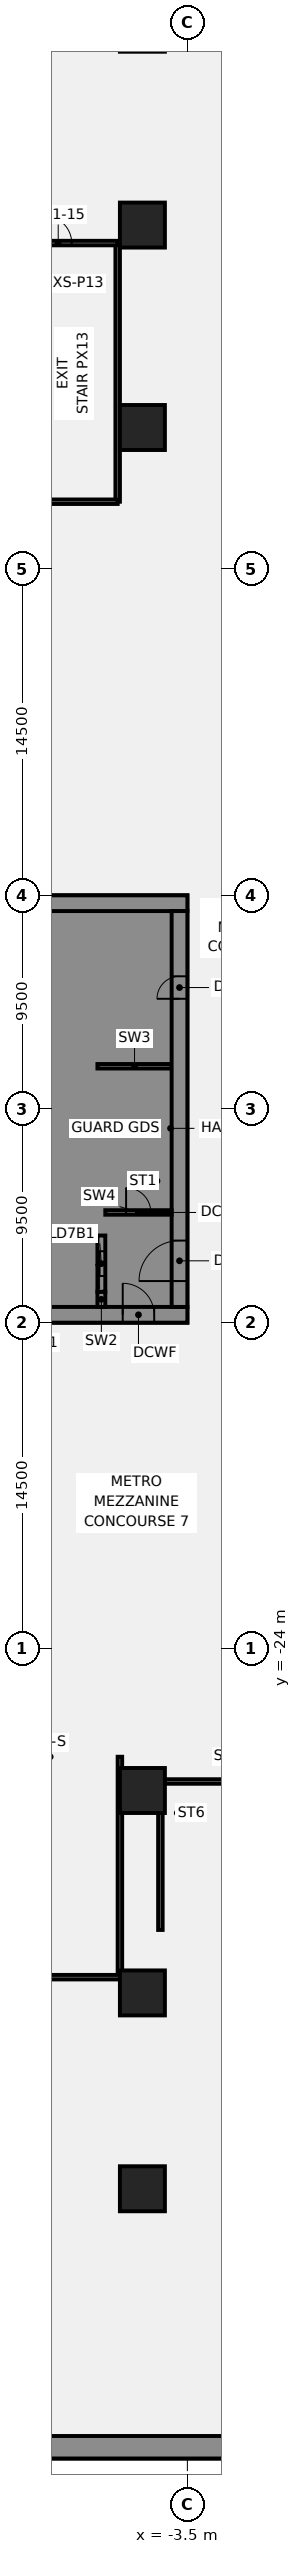
"""IFC4 building model, lengths in metres.
Left out: names, types, materials, properties, quantities, classifications, styles, units other than length and angle.
Written with IfcOpenShell. Run it as: python <this file> out.ifc"""

import sys

from ifc_helpers import new_model, si_unit, direction, frame, frame_2d, origin, origin_2d, place, context, subcontext, project, spatial, polyline, rectangle, outline, extrude, element, fill, save


model = new_model("IFC4")
c1 = context("Model", 3, precision=1e-05, world=origin(), true_north=direction((0.0, 1.0)))
c2 = subcontext(c1, "Body", "Model", "MODEL_VIEW")
j1 = project(units=[si_unit("LENGTHUNIT", "METRE"), si_unit("PLANEANGLEUNIT", "RADIAN")], contexts=[c1])
p1 = place(None, origin())
s1 = spatial("IfcSite", under=j1, at=p1, CompositionType="ELEMENT")
p2 = place(p1, origin())
s2 = spatial("IfcBuilding", under=s1, at=p2, CompositionType="ELEMENT")
p3 = place(p2, frame((0.0, 0.0, -7.0)))
s3 = spatial("IfcBuildingStorey", under=s2, at=p3, CompositionType="ELEMENT", Elevation=-7.0)
p4 = place(p3, frame((63.931, -59.5, -0.45), z_axis=(0.0, 0.0, 1.0), x_axis=(-1.0, 0.0, 0.0)))
e1 = element("IfcWall", 1, at=p4, inside=s3, PredefinedType="SOLIDWALL", context=c2, shape_type="SweptSolid", body=[
    extrude(rectangle(XDim=127.863, YDim=1.0, at=frame_2d((63.931, 0.0))), origin(), (0.0, 0.0, 1.0), 6.9),
])
for number, where, z_axis, x_axis in (
    (2, (-5.5, 39.3, -0.45), (0.0, 0.0, 1.0), (1.0, 0.0, 0.0)),
    (3, (-5.5, 30.3, -0.45), (0.0, 0.0, 1.0), (1.0, 0.0, 0.0)),
    (4, (-5.5, -39.3, -0.45), (0.0, 0.0, 1.0), (1.0, 0.0, 0.0)),
    (5, (-5.5, -30.3, -0.45), (0.0, 0.0, 1.0), (1.0, 0.0, 0.0)),
    (6, (-5.5, -48.008, -0.45), (0.0, 0.0, 1.0), (1.0, 0.0, 0.0)),
):
    element("IfcColumn", number, at=place(p3, frame(where, z_axis=z_axis, x_axis=x_axis)), inside=s3, PredefinedType="COLUMN", context=c2, shape_type="SweptSolid", body=[
        extrude(rectangle(XDim=2.0, YDim=2.0, at=origin_2d()), origin(), (0.0, 0.0, 1.0), 6.9),
    ])
p5 = place(p3, frame((-6.6, 27.0, 0.0), z_axis=(0.0, 0.0, 1.0), x_axis=(0.0, 1.0, 0.0)))
e7 = element("IfcWall", 7, at=p5, inside=s3, PredefinedType="PARTITIONING", context=c2, shape_type="SweptSolid", body=[
    extrude(rectangle(XDim=11.5, YDim=0.2, at=frame_2d((5.75, 0.0))), origin(), (0.0, 0.0, 1.0), 6.45),
])
p6 = place(p3, frame((-10.5, 27.0, 0.0), z_axis=(0.0, 0.0, 1.0), x_axis=(1.0, 0.0, 0.0)))
e8 = element("IfcWall", 8, at=p6, inside=s3, PredefinedType="PARTITIONING", context=c2, shape_type="SweptSolid", body=[
    extrude(rectangle(XDim=3.9, YDim=0.2, at=frame_2d((1.95, 0.0))), origin(), (0.0, 0.0, 1.0), 6.45),
])
p7 = place(p3, frame((-10.5, 38.5, 0.0), z_axis=(0.0, 0.0, 1.0), x_axis=(1.0, 0.0, 0.0)))
e9 = element("IfcWall", 9, at=p7, inside=s3, PredefinedType="PARTITIONING", context=c2, shape_type="SweptSolid", body=[
    extrude(rectangle(XDim=3.9, YDim=0.2, at=frame_2d((1.95, 0.0))), origin(), (0.0, 0.0, 1.0), 6.45),
])
p8 = place(p7, frame((0.656, 0.0, 0.0)))
e10 = element("IfcOpeningElement", 10, at=p8, cuts=e9, PredefinedType="OPENING", context=c2, shape_type="SweptSolid", body=[
    extrude(rectangle(XDim=1.2, YDim=2.1, at=frame_2d((0.6, 1.05))), frame((0.0, 0.11, 0.0), z_axis=(0.0, -1.0, 0.0), x_axis=(1.0, 0.0, 0.0)), (0.0, 0.0, 1.0), 0.22),
])
p9 = place(p3, frame((-6.5, -28.8, 0.0), z_axis=(0.0, 0.0, 1.0), x_axis=(0.0, -1.0, 0.0)))
e11 = element("IfcWall", 11, at=p9, inside=s3, PredefinedType="SOLIDWALL", context=c2, shape_type="SweptSolid", body=[
    extrude(rectangle(XDim=9.7, YDim=0.2, at=frame_2d((4.85, 0.0))), origin(), (0.0, 0.0, 1.0), 6.45),
])
p10 = place(p3, frame((-10.7, -38.6, 0.0), z_axis=(0.0, 0.0, 1.0), x_axis=(1.0, 0.0, 0.0)))
e12 = element("IfcWall", 12, at=p10, inside=s3, PredefinedType="SOLIDWALL", context=c2, shape_type="SweptSolid", body=[
    extrude(rectangle(XDim=4.3, YDim=0.2, at=frame_2d((2.15, 0.0))), origin(), (0.0, 0.0, 1.0), 6.45),
])
p11 = place(p3, frame((-16.5, -9.15, 0.0), z_axis=(0.0, 0.0, 1.0), x_axis=(1.0, 0.0, 0.0)))
e13 = element("IfcWall", 13, at=p11, inside=s3, PredefinedType="SHEAR", context=c2, shape_type="SweptSolid", body=[
    extrude(rectangle(XDim=13.0, YDim=0.7, at=frame_2d((6.5, 0.0))), origin(), (0.0, 0.0, 1.0), 6.45),
])
p12 = place(p11, frame((4.15, 0.0, 0.0)))
e14 = element("IfcOpeningElement", 14, at=p12, cuts=e13, PredefinedType="OPENING", context=c2, shape_type="SweptSolid", body=[
    extrude(rectangle(XDim=1.4, YDim=2.1, at=frame_2d((0.7, 1.05))), frame((0.0, 0.36, 0.0), z_axis=(0.0, -1.0, 0.0), x_axis=(1.0, 0.0, 0.0)), (0.0, 0.0, 1.0), 0.72),
])
p13 = place(p11, frame((10.125, 0.0, 0.0)))
e15 = element("IfcOpeningElement", 15, at=p13, cuts=e13, PredefinedType="OPENING", context=c2, shape_type="SweptSolid", body=[
    extrude(rectangle(XDim=1.4, YDim=2.1, at=frame_2d((0.7, 1.05))), frame((0.0, 0.36, 0.0), z_axis=(0.0, -1.0, 0.0), x_axis=(1.0, 0.0, 0.0)), (0.0, 0.0, 1.0), 0.72),
])
p14 = place(p3, frame((-16.5, 9.15, 0.0), z_axis=(0.0, 0.0, 1.0), x_axis=(1.0, 0.0, 0.0)))
e16 = element("IfcWall", 16, at=p14, inside=s3, PredefinedType="SHEAR", context=c2, shape_type="SweptSolid", body=[
    extrude(rectangle(XDim=13.0, YDim=0.7, at=frame_2d((6.5, 0.0))), origin(), (0.0, 0.0, 1.0), 6.45),
])
p15 = place(p3, origin())
e17 = element("IfcWall", 17, at=p15, inside=s3, PredefinedType="SHEAR", context=c2, shape_type="SweptSolid", body=[
    extrude(outline(polyline([(-9.8, -5.375), (-9.8, -5.625), (-7.5, -5.625), (-7.15, -5.625), (-7.15, 8.8), (-7.5, 8.8), (-9.8, 8.8), (-9.8, 8.125), (-7.5, 8.125), (-7.5, 5.625), (-9.8, 5.625), (-9.8, 5.375), (-7.5, 5.375), (-7.5, 2.875), (-9.8, 2.875), (-9.8, 2.625), (-7.5, 2.625), (-7.5, 0.125), (-9.8, 0.125), (-9.8, -0.125), (-7.5, -0.125), (-7.5, -2.625), (-9.8, -2.625), (-9.8, -2.875), (-7.5, -2.875), (-7.5, -5.375), (-9.8, -5.375)])), origin(), (0.0, 0.0, 1.0), 6.45),
])
p16 = place(p3, origin())
e18 = element("IfcWall", 18, at=p16, inside=s3, PredefinedType="SHEAR", context=c2, shape_type="SweptSolid", body=[
    extrude(outline(polyline([(-7.5, -8.125), (-9.55, -8.125), (-9.55, -5.625), (-9.8, -5.625), (-9.8, -8.125), (-9.8, -8.8), (-7.5, -8.8), (-7.5, -8.125)])), origin(), (0.0, 0.0, 1.0), 6.45),
])
p17 = place(p3, frame((-7.325, -8.8, 0.0), z_axis=(0.0, 0.0, 1.0), x_axis=(0.0, 1.0, 0.0)))
e19 = element("IfcWall", 19, at=p17, inside=s3, PredefinedType="SHEAR", context=c2, shape_type="SweptSolid", body=[
    extrude(rectangle(XDim=0.675, YDim=0.35, at=frame_2d((0.337, 0.0))), origin(), (0.0, 0.0, 1.0), 6.45),
])
p18 = place(p3, frame((-7.5, 1.9, 0.0), z_axis=(0.0, 0.0, 1.0), x_axis=(1.0, 0.0, 0.0)))
e20 = element("IfcWall", 20, at=p18, inside=s3, PredefinedType="SHEAR", context=c2, shape_type="SweptSolid", body=[
    extrude(rectangle(XDim=3.3, YDim=0.2, at=frame_2d((1.65, 0.0))), origin(), (0.0, 0.0, 1.0), 6.45),
])
p19 = place(p3, frame((-7.325, -8.125, 0.0), z_axis=(0.0, 0.0, 1.0), x_axis=(0.0, 1.0, 0.0)))
e21 = element("IfcWall", 21, at=p19, inside=s3, PredefinedType="SHEAR", context=c2, shape_type="SweptSolid", body=[
    extrude(rectangle(XDim=2.5, YDim=0.35, at=frame_2d((1.25, 0.0))), origin(), (0.0, 0.0, 1.0), 6.45),
])
p20 = place(p19, frame((0.7, 0.0, 0.0)))
e22 = element("IfcOpeningElement", 22, at=p20, cuts=e21, PredefinedType="OPENING", context=c2, shape_type="SweptSolid", body=[
    extrude(rectangle(XDim=1.1, YDim=2.1, at=frame_2d((0.55, 1.05))), frame((0.0, 0.185, 0.0), z_axis=(0.0, -1.0, 0.0), x_axis=(1.0, 0.0, 0.0)), (0.0, 0.0, 1.0), 0.37),
])
p21 = place(p3, frame((-3.85, -8.8, 0.0), z_axis=(0.0, 0.0, 1.0), x_axis=(0.0, 1.0, 0.0)))
e23 = element("IfcWall", 23, at=p21, inside=s3, PredefinedType="SHEAR", context=c2, shape_type="SweptSolid", body=[
    extrude(rectangle(XDim=17.6, YDim=0.7, at=frame_2d((8.8, 0.0))), origin(), (0.0, 0.0, 1.0), 6.45),
])
p22 = place(p21, frame((1.15, 0.0, 0.0)))
e24 = element("IfcOpeningElement", 24, at=p22, cuts=e23, PredefinedType="OPENING", context=c2, shape_type="SweptSolid", body=[
    extrude(rectangle(XDim=1.8, YDim=2.1, at=frame_2d((0.9, 1.05))), frame((0.0, 0.36, 0.0), z_axis=(0.0, -1.0, 0.0), x_axis=(1.0, 0.0, 0.0)), (0.0, 0.0, 1.0), 0.72),
])
p23 = place(p21, frame((13.7, 0.0, 0.0)))
e25 = element("IfcOpeningElement", 25, at=p23, cuts=e23, PredefinedType="OPENING", context=c2, shape_type="SweptSolid", body=[
    extrude(rectangle(XDim=1.0, YDim=2.1, at=frame_2d((0.5, 1.05))), frame((0.0, 0.36, 0.0), z_axis=(0.0, -1.0, 0.0), x_axis=(1.0, 0.0, 0.0)), (0.0, 0.0, 1.0), 0.72),
])
p24 = place(p3, frame((-7.15, -4.6, 0.0), z_axis=(0.0, 0.0, 1.0), x_axis=(1.0, 0.0, 0.0)))
e26 = element("IfcWall", 26, at=p24, inside=s3, PredefinedType="SHEAR", context=c2, shape_type="SweptSolid", body=[
    extrude(rectangle(XDim=2.95, YDim=0.2, at=frame_2d((1.475, 0.0))), origin(), (0.0, 0.0, 1.0), 6.45),
])
p25 = place(p24, frame((0.925, 0.0, 0.0)))
e27 = element("IfcOpeningElement", 27, at=p25, cuts=e26, PredefinedType="OPENING", context=c2, shape_type="SweptSolid", body=[
    extrude(rectangle(XDim=1.1, YDim=2.1, at=frame_2d((0.55, 1.05))), frame((0.0, 0.11, 0.0), z_axis=(0.0, -1.0, 0.0), x_axis=(1.0, 0.0, 0.0)), (0.0, 0.0, 1.0), 0.22),
])
p26 = place(p3, frame((-4.7, -29.8, 0.0), z_axis=(0.0, 0.0, 1.0), x_axis=(0.0, -1.0, 0.0)))
e28 = element("IfcWall", 28, at=p26, inside=s3, PredefinedType="SHEAR", context=c2, shape_type="SweptSolid", body=[
    extrude(rectangle(XDim=6.7, YDim=0.2, at=frame_2d((3.35, 0.0))), origin(), (0.0, 0.0, 1.0), 6.45),
])
p27 = place(p3, frame((-4.6, -29.9, 0.0), z_axis=(0.0, 0.0, 1.0), x_axis=(1.0, 0.0, 0.0)))
e29 = element("IfcWall", 29, at=p27, inside=s3, PredefinedType="SHEAR", context=c2, shape_type="SweptSolid", body=[
    extrude(rectangle(XDim=3.2, YDim=0.2, at=frame_2d((1.6, 0.0))), origin(), (0.0, 0.0, 1.0), 6.45),
])
p28 = place(p3, origin())
e30 = element("IfcWall", 30, at=p28, inside=s3, PredefinedType="SHEAR", context=c2, shape_type="SweptSolid", body=[
    extrude(outline(polyline([(-4.6, -36.3), (-4.6, -36.5), (-1.4, -36.5), (-1.4, -36.3), (-4.6, -36.3)])), origin(), (0.0, 0.0, 1.0), 6.45),
])
p29 = place(p8, origin())
e31 = element("IfcDoor", 31, at=p29, inside=s3, OperationType="SINGLE_SWING_LEFT", PredefinedType="DOOR", context=c2, shape_type="SweptSolid", body=[
    extrude(rectangle(XDim=1.2, YDim=2.1, at=frame_2d((0.6, 1.05))), frame((0.0, 0.025, 0.0), z_axis=(0.0, -1.0, 0.0), x_axis=(1.0, 0.0, 0.0)), (0.0, 0.0, 1.0), 0.05),
])
fill(e10, e31)
p30 = place(p13, origin())
e32 = element("IfcDoor", 32, at=p30, inside=s3, OperationType="SINGLE_SWING_LEFT", PredefinedType="DOOR", context=c2, shape_type="SweptSolid", body=[
    extrude(rectangle(XDim=1.4, YDim=2.1, at=frame_2d((0.7, 1.05))), frame((0.0, 0.025, 0.0), z_axis=(0.0, -1.0, 0.0), x_axis=(1.0, 0.0, 0.0)), (0.0, 0.0, 1.0), 0.05),
])
fill(e15, e32)
p31 = place(p22, origin())
e33 = element("IfcDoor", 33, at=p31, inside=s3, OperationType="SINGLE_SWING_LEFT", PredefinedType="DOOR", context=c2, shape_type="SweptSolid", body=[
    extrude(rectangle(XDim=1.8, YDim=2.1, at=frame_2d((0.9, 1.05))), frame((0.0, 0.025, 0.0), z_axis=(0.0, -1.0, 0.0), x_axis=(1.0, 0.0, 0.0)), (0.0, 0.0, 1.0), 0.05),
])
fill(e24, e33)
p32 = place(p23, origin())
e34 = element("IfcDoor", 34, at=p32, inside=s3, OperationType="SINGLE_SWING_LEFT", PredefinedType="DOOR", context=c2, shape_type="SweptSolid", body=[
    extrude(rectangle(XDim=1.0, YDim=2.1, at=frame_2d((0.5, 1.05))), frame((0.0, 0.025, 0.0), z_axis=(0.0, -1.0, 0.0), x_axis=(1.0, 0.0, 0.0)), (0.0, 0.0, 1.0), 0.05),
])
fill(e25, e34)
p33 = place(p25, origin())
e35 = element("IfcDoor", 35, at=p33, inside=s3, OperationType="SINGLE_SWING_LEFT", PredefinedType="DOOR", context=c2, shape_type="SweptSolid", body=[
    extrude(rectangle(XDim=1.1, YDim=2.1, at=frame_2d((0.55, 1.05))), frame((0.0, 0.025, 0.0), z_axis=(0.0, -1.0, 0.0), x_axis=(1.0, 0.0, 0.0)), (0.0, 0.0, 1.0), 0.05),
])
fill(e27, e35)
p34 = place(p20, origin())
e36 = element("IfcDoor", 36, at=p34, inside=s3, OperationType="SLIDING_TO_LEFT", PredefinedType="DOOR", context=c2, shape_type="SweptSolid", body=[
    extrude(rectangle(XDim=1.1, YDim=2.1, at=frame_2d((0.55, 1.05))), frame((0.0, 0.025, 0.0), z_axis=(0.0, -1.0, 0.0), x_axis=(1.0, 0.0, 0.0)), (0.0, 0.0, 1.0), 0.05),
])
fill(e22, e36)
save(model, sys.argv[1])
